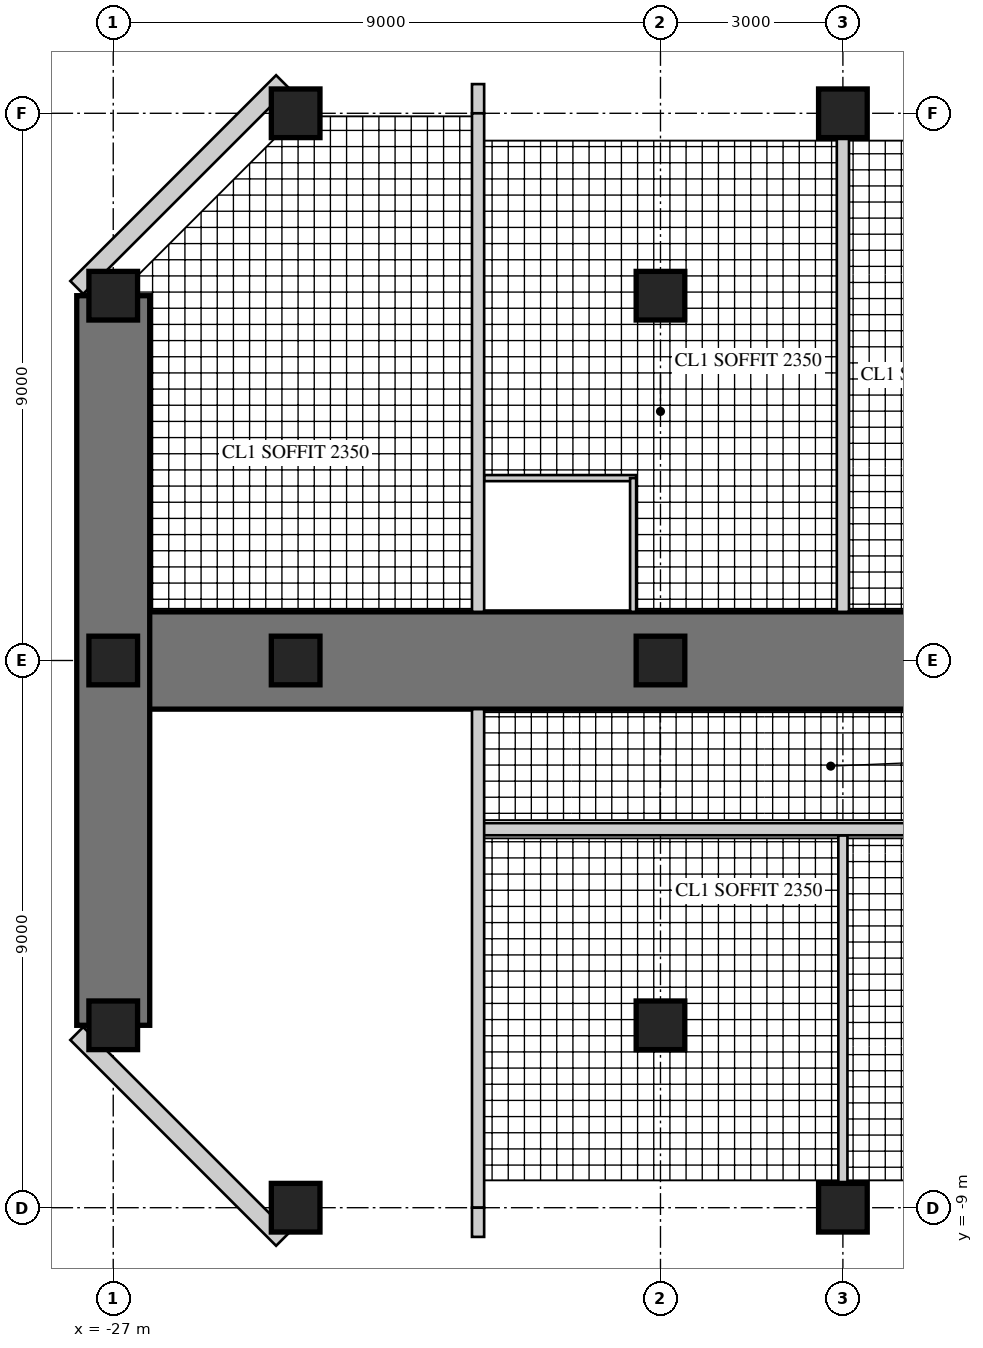
"""IFC4 building model, lengths in metres.
Left out: names, types, materials, properties, quantities, classifications, styles, units other than length and angle.
Written with IfcOpenShell. Run it as: python <this file> out.ifc"""

import sys

from ifc_helpers import new_model, si_unit, direction, frame, frame_2d, origin, origin_2d, place, context, subcontext, project, spatial, rectangle, hollow_rectangle, extrude, element, fill, save


model = new_model("IFC4")
c1 = context("Model", 3, precision=1e-05, world=origin(), true_north=direction((0.0, 1.0)))
c2 = subcontext(c1, "Body", "Model", "MODEL_VIEW")
j1 = project(units=[si_unit("LENGTHUNIT", "METRE"), si_unit("PLANEANGLEUNIT", "RADIAN")], contexts=[c1])
p1 = place(None, origin())
s1 = spatial("IfcSite", under=j1, at=p1, CompositionType="ELEMENT")
p2 = place(p1, origin())
s2 = spatial("IfcBuilding", under=s1, at=p2, CompositionType="ELEMENT")
p3 = place(p2, frame((0.0, 0.0, 235.7)))
s3 = spatial("IfcBuildingStorey", under=s2, at=p3, CompositionType="ELEMENT", Elevation=235.7)
p4 = place(p3, frame((-9.0, 0.0, 0.0), z_axis=(0.0, 0.0, 1.0), x_axis=(-1.0, 0.0, 0.0)))
e1 = element("IfcWall", 1, at=p4, inside=s3, PredefinedType="SHEAR", context=c2, shape_type="SweptSolid", body=[
    extrude(rectangle(XDim=18.0, YDim=1.6, at=frame_2d((9.0, 0.0))), origin(), (0.0, 0.0, 1.0), 3.4),
])
p5 = place(p4, frame((3.8, 0.0, 0.0)))
e2 = element("IfcOpeningElement", 2, at=p5, cuts=e1, PredefinedType="OPENING", context=c2, shape_type="SweptSolid", body=[
    extrude(rectangle(XDim=1.0, YDim=2.15, at=frame_2d((0.5, 1.075))), frame((0.0, 0.81, 0.0), z_axis=(0.0, -1.0, 0.0), x_axis=(1.0, 0.0, 0.0)), (0.0, 0.0, 1.0), 1.62),
])
p6 = place(p4, frame((6.6, 0.0, 0.0)))
e3 = element("IfcOpeningElement", 3, at=p6, cuts=e1, PredefinedType="OPENING", context=c2, shape_type="SweptSolid", body=[
    extrude(rectangle(XDim=1.0, YDim=2.15, at=frame_2d((0.5, 1.075))), frame((0.0, 0.81, 0.0), z_axis=(0.0, -1.0, 0.0), x_axis=(1.0, 0.0, 0.0)), (0.0, 0.0, 1.0), 1.62),
])
p7 = place(p4, frame((13.3, 0.0, 0.0)))
e4 = element("IfcOpeningElement", 4, at=p7, cuts=e1, PredefinedType="OPENING", context=c2, shape_type="SweptSolid", body=[
    extrude(rectangle(XDim=1.0, YDim=2.2, at=frame_2d((0.5, 1.1))), frame((0.0, 0.81, 0.0), z_axis=(0.0, -1.0, 0.0), x_axis=(1.0, 0.0, 0.0)), (0.0, 0.0, 1.0), 1.62),
])
p8 = place(p3, frame((-27.0, 6.0, 0.0), z_axis=(0.0, 0.0, 1.0), x_axis=(0.0, -1.0, 0.0)))
e5 = element("IfcWall", 5, at=p8, inside=s3, PredefinedType="SHEAR", context=c2, shape_type="SweptSolid", body=[
    extrude(rectangle(XDim=12.0, YDim=1.2, at=frame_2d((6.0, 0.0))), origin(), (0.0, 0.0, 1.0), 3.4),
])
p9 = place(p8, frame((1.4, 0.0, 0.6)))
e6 = element("IfcOpeningElement", 6, at=p9, cuts=e5, PredefinedType="OPENING", context=c2, shape_type="SweptSolid", body=[
    extrude(rectangle(XDim=3.0, YDim=2.4, at=frame_2d((1.5, 1.2))), frame((0.0, 0.61, 0.0), z_axis=(0.0, -1.0, 0.0), x_axis=(1.0, 0.0, 0.0)), (0.0, 0.0, 1.0), 1.22),
])
p10 = place(p8, frame((7.6, 0.0, 0.6)))
e7 = element("IfcOpeningElement", 7, at=p10, cuts=e5, PredefinedType="OPENING", context=c2, shape_type="SweptSolid", body=[
    extrude(rectangle(XDim=3.0, YDim=2.4, at=frame_2d((1.5, 1.2))), frame((0.0, 0.61, 0.0), z_axis=(0.0, -1.0, 0.0), x_axis=(1.0, 0.0, 0.0)), (0.0, 0.0, 1.0), 1.22),
])
for number, where, z_axis, x_axis in (
    (8, (-15.0, 9.0, 0.0), (0.0, 0.0, 1.0), (1.0, 0.0, 0.0)),
    (9, (-24.0, 9.0, 0.0), (0.0, 0.0, 1.0), (1.0, 0.0, 0.0)),
    (10, (-15.0, -9.0, 0.0), (0.0, 0.0, 1.0), (1.0, 0.0, 0.0)),
    (11, (-24.0, -9.0, 0.0), (0.0, 0.0, 1.0), (1.0, 0.0, 0.0)),
    (12, (-27.0, 6.0, 0.0), (0.0, 0.0, 1.0), (1.0, 0.0, 0.0)),
    (13, (-27.0, 0.0, 0.0), (0.0, 0.0, 1.0), (1.0, 0.0, 0.0)),
    (14, (-27.0, -6.0, 0.0), (0.0, 0.0, 1.0), (1.0, 0.0, 0.0)),
    (15, (-18.0, 6.0, 0.0), (0.0, 0.0, 1.0), (1.0, 0.0, 0.0)),
    (16, (-18.0, 0.0, 0.0), (0.0, 0.0, 1.0), (1.0, 0.0, 0.0)),
    (17, (-18.0, -6.0, 0.0), (0.0, 0.0, 1.0), (1.0, 0.0, 0.0)),
    (18, (-24.0, 0.0, 0.0), (0.0, 0.0, 1.0), (1.0, 0.0, 0.0)),
):
    element("IfcColumn", number, at=place(p3, frame(where, z_axis=z_axis, x_axis=x_axis)), inside=s3, PredefinedType="COLUMN", context=c2, shape_type="SweptSolid", body=[
        extrude(rectangle(XDim=0.8, YDim=0.8, at=origin_2d()), origin(), (0.0, 0.0, 1.0), 3.4),
    ])
p11 = place(p3, frame((-24.215, 9.52, 0.0), z_axis=(0.0, 0.0, 1.0), x_axis=(-0.707132283189, -0.707081278264, 0.0)))
e19 = element("IfcWall", 19, at=p11, inside=s3, PredefinedType="SOLIDWALL", context=c2, shape_type="SweptSolid", body=[
    extrude(rectangle(XDim=4.787, YDim=0.3, at=frame_2d((2.393, 0.0))), origin(), (0.0, 0.0, 1.0), 3.22),
])
p12 = place(p11, frame((1.943, 0.0, 0.3)))
e20 = element("IfcOpeningElement", 20, at=p12, cuts=e19, PredefinedType="OPENING", context=c2, shape_type="SweptSolid", body=[
    extrude(rectangle(XDim=0.9, YDim=2.4, at=frame_2d((0.45, 1.2))), frame((0.0, 0.16, 0.0), z_axis=(0.0, -1.0, 0.0), x_axis=(1.0, 0.0, 0.0)), (0.0, 0.0, 1.0), 0.32),
])
p13 = place(p3, frame((-27.6, -6.135, 0.0), z_axis=(0.0, 0.0, 1.0), x_axis=(0.707132283189, -0.707081278264, 0.0)))
e21 = element("IfcWall", 21, at=p13, inside=s3, PredefinedType="SOLIDWALL", context=c2, shape_type="SweptSolid", body=[
    extrude(rectangle(XDim=4.787, YDim=0.3, at=frame_2d((2.393, 0.0))), origin(), (0.0, 0.0, 1.0), 3.22),
])
p14 = place(p13, frame((1.943, 0.0, 0.3)))
e22 = element("IfcOpeningElement", 22, at=p14, cuts=e21, PredefinedType="OPENING", context=c2, shape_type="SweptSolid", body=[
    extrude(rectangle(XDim=0.9, YDim=2.4, at=frame_2d((0.45, 1.2))), frame((0.0, 0.16, 0.0), z_axis=(0.0, -1.0, 0.0), x_axis=(1.0, 0.0, 0.0)), (0.0, 0.0, 1.0), 0.32),
])
p15 = place(p3, frame((-15.0, -2.875, 0.0), z_axis=(0.0, 0.0, 1.0), x_axis=(0.0, -1.0, 0.0)))
e23 = element("IfcWall", 23, at=p15, inside=s3, PredefinedType="PARTITIONING", context=c2, shape_type="SweptSolid", body=[
    extrude(rectangle(XDim=5.725, YDim=0.15, at=frame_2d((2.863, 0.0))), origin(), (0.0, 0.0, 1.0), 2.52),
])
p16 = place(p15, frame((0.5, 0.0, 0.0)))
e24 = element("IfcOpeningElement", 24, at=p16, cuts=e23, PredefinedType="OPENING", context=c2, shape_type="SweptSolid", body=[
    extrude(rectangle(XDim=1.0, YDim=2.1, at=frame_2d((0.5, 1.05))), frame((0.0, 0.085, 0.0), z_axis=(0.0, -1.0, 0.0), x_axis=(1.0, 0.0, 0.0)), (0.0, 0.0, 1.0), 0.17),
])
p17 = place(p3, frame((-15.0, 8.6, 0.0), z_axis=(0.0, 0.0, 1.0), x_axis=(0.0, -1.0, 0.0)))
e25 = element("IfcWall", 25, at=p17, inside=s3, PredefinedType="SOLIDWALL", context=c2, shape_type="SweptSolid", body=[
    extrude(rectangle(XDim=7.8, YDim=0.2, at=frame_2d((3.9, 0.0))), origin(), (0.0, 0.0, 1.0), 2.52),
])
p18 = place(p3, frame((-18.4, 3.0, 0.0), z_axis=(0.0, 0.0, 1.0), x_axis=(-1.0, 0.0, 0.0)))
e26 = element("IfcWall", 26, at=p18, inside=s3, PredefinedType="PARTITIONING", context=c2, shape_type="SweptSolid", body=[
    extrude(rectangle(XDim=2.5, YDim=0.1, at=frame_2d((1.25, 0.0))), origin(), (0.0, 0.0, 1.0), 3.22),
])
p19 = place(p3, frame((-18.45, 3.0, 0.0), z_axis=(0.0, 0.0, 1.0), x_axis=(0.0, -1.0, 0.0)))
e27 = element("IfcWall", 27, at=p19, inside=s3, PredefinedType="PARTITIONING", context=c2, shape_type="SweptSolid", body=[
    extrude(rectangle(XDim=2.2, YDim=0.1, at=frame_2d((1.1, 0.0))), origin(), (0.0, 0.0, 1.0), 3.22),
])
p20 = place(p19, frame((0.55, 0.0, 0.0)))
e28 = element("IfcOpeningElement", 28, at=p20, cuts=e27, PredefinedType="OPENING", context=c2, shape_type="SweptSolid", body=[
    extrude(rectangle(XDim=0.9, YDim=2.1, at=frame_2d((0.45, 1.05))), frame((0.0, 0.06, 0.0), z_axis=(0.0, -1.0, 0.0), x_axis=(1.0, 0.0, 0.0)), (0.0, 0.0, 1.0), 0.12),
])
p21 = place(p3, frame((-9.4, -2.775, 0.0), z_axis=(0.0, 0.0, 1.0), x_axis=(-1.0, 0.0, 0.0)))
e29 = element("IfcWall", 29, at=p21, inside=s3, PredefinedType="SOLIDWALL", context=c2, shape_type="SweptSolid", body=[
    extrude(rectangle(XDim=11.6, YDim=0.2, at=frame_2d((5.8, 0.0))), origin(), (0.0, 0.0, 1.0), 3.22),
])
p22 = place(p21, frame((3.4, 0.0, 0.0)))
e30 = element("IfcOpeningElement", 30, at=p22, cuts=e29, PredefinedType="OPENING", context=c2, shape_type="SweptSolid", body=[
    extrude(rectangle(XDim=1.0, YDim=2.15, at=frame_2d((0.5, 1.075))), frame((0.0, 0.11, 0.0), z_axis=(0.0, -1.0, 0.0), x_axis=(1.0, 0.0, 0.0)), (0.0, 0.0, 1.0), 0.22),
])
p23 = place(p3, frame((-21.0, 9.48, 0.0), z_axis=(0.0, 0.0, 1.0), x_axis=(0.0, -1.0, 0.0)))
e31 = element("IfcWall", 31, at=p23, inside=s3, PredefinedType="SOLIDWALL", context=c2, shape_type="SweptSolid", body=[
    extrude(rectangle(XDim=0.48, YDim=0.2, at=frame_2d((0.24, 0.0))), origin(), (0.0, 0.0, 1.0), 3.22),
])
p24 = place(p3, frame((-21.0, 9.0, 0.0), z_axis=(0.0, 0.0, 1.0), x_axis=(0.0, -1.0, 0.0)))
e32 = element("IfcWall", 32, at=p24, inside=s3, PredefinedType="SOLIDWALL", context=c2, shape_type="SweptSolid", body=[
    extrude(rectangle(XDim=8.2, YDim=0.2, at=frame_2d((4.1, 0.0))), origin(), (0.0, 0.0, 1.0), 2.67),
])
p25 = place(p3, frame((-21.0, -0.8, 0.0), z_axis=(0.0, 0.0, 1.0), x_axis=(0.0, -1.0, 0.0)))
e33 = element("IfcWall", 33, at=p25, inside=s3, PredefinedType="SOLIDWALL", context=c2, shape_type="SweptSolid", body=[
    extrude(rectangle(XDim=8.2, YDim=0.2, at=frame_2d((4.1, 0.0))), origin(), (0.0, 0.0, 1.0), 2.67),
])
p26 = place(p25, frame((0.35, 0.0, 0.0)))
e34 = element("IfcOpeningElement", 34, at=p26, cuts=e33, PredefinedType="OPENING", context=c2, shape_type="SweptSolid", body=[
    extrude(rectangle(XDim=1.0, YDim=2.2, at=frame_2d((0.5, 1.1))), frame((0.0, 0.11, 0.0), z_axis=(0.0, -1.0, 0.0), x_axis=(1.0, 0.0, 0.0)), (0.0, 0.0, 1.0), 0.22),
])
p27 = place(p3, frame((-21.0, -9.0, 0.0), z_axis=(0.0, 0.0, 1.0), x_axis=(0.0, -1.0, 0.0)))
e35 = element("IfcWall", 35, at=p27, inside=s3, PredefinedType="SOLIDWALL", context=c2, shape_type="SweptSolid", body=[
    extrude(rectangle(XDim=0.48, YDim=0.2, at=frame_2d((0.24, 0.0))), origin(), (0.0, 0.0, 1.0), 3.22),
])
p28 = place(p12, origin())
e36 = element("IfcWindow", 36, at=p28, inside=s3, PartitioningType="SINGLE_PANEL", PredefinedType="WINDOW", context=c2, shape_type="SweptSolid", body=[
    extrude(hollow_rectangle(XDim=0.9, YDim=2.4, WallThickness=0.06, at=frame_2d((0.45, 1.2))), frame((0.0, 0.03, 0.0), z_axis=(0.0, -1.0, 0.0), x_axis=(1.0, 0.0, 0.0)), (0.0, 0.0, 1.0), 0.06),
    extrude(rectangle(XDim=0.779, YDim=2.279, at=frame_2d((0.45, 1.2))), frame((0.0, 0.03, 0.0), z_axis=(0.0, -1.0, 0.0), x_axis=(1.0, 0.0, 0.0)), (0.0, 0.0, 1.0), 0.06),
])
fill(e20, e36)
p29 = place(p9, origin())
e37 = element("IfcWindow", 37, at=p29, inside=s3, PartitioningType="SINGLE_PANEL", PredefinedType="WINDOW", context=c2, shape_type="SweptSolid", body=[
    extrude(hollow_rectangle(XDim=3.0, YDim=2.4, WallThickness=0.06, at=frame_2d((1.5, 1.2))), frame((0.0, 0.03, 0.0), z_axis=(0.0, -1.0, 0.0), x_axis=(1.0, 0.0, 0.0)), (0.0, 0.0, 1.0), 0.06),
    extrude(rectangle(XDim=2.879, YDim=2.279, at=frame_2d((1.5, 1.2))), frame((0.0, 0.03, 0.0), z_axis=(0.0, -1.0, 0.0), x_axis=(1.0, 0.0, 0.0)), (0.0, 0.0, 1.0), 0.06),
])
fill(e6, e37)
p30 = place(p10, origin())
e38 = element("IfcWindow", 38, at=p30, inside=s3, PartitioningType="SINGLE_PANEL", PredefinedType="WINDOW", context=c2, shape_type="SweptSolid", body=[
    extrude(hollow_rectangle(XDim=3.0, YDim=2.4, WallThickness=0.06, at=frame_2d((1.5, 1.2))), frame((0.0, 0.03, 0.0), z_axis=(0.0, -1.0, 0.0), x_axis=(1.0, 0.0, 0.0)), (0.0, 0.0, 1.0), 0.06),
    extrude(rectangle(XDim=2.879, YDim=2.279, at=frame_2d((1.5, 1.2))), frame((0.0, 0.03, 0.0), z_axis=(0.0, -1.0, 0.0), x_axis=(1.0, 0.0, 0.0)), (0.0, 0.0, 1.0), 0.06),
])
fill(e7, e38)
p31 = place(p14, origin())
e39 = element("IfcWindow", 39, at=p31, inside=s3, PartitioningType="SINGLE_PANEL", PredefinedType="WINDOW", context=c2, shape_type="SweptSolid", body=[
    extrude(hollow_rectangle(XDim=0.9, YDim=2.4, WallThickness=0.06, at=frame_2d((0.45, 1.2))), frame((0.0, 0.03, 0.0), z_axis=(0.0, -1.0, 0.0), x_axis=(1.0, 0.0, 0.0)), (0.0, 0.0, 1.0), 0.06),
    extrude(rectangle(XDim=0.779, YDim=2.279, at=frame_2d((0.45, 1.2))), frame((0.0, 0.03, 0.0), z_axis=(0.0, -1.0, 0.0), x_axis=(1.0, 0.0, 0.0)), (0.0, 0.0, 1.0), 0.06),
])
fill(e22, e39)
p32 = place(p16, origin())
e40 = element("IfcDoor", 40, at=p32, inside=s3, OperationType="SINGLE_SWING_LEFT", PredefinedType="DOOR", context=c2, shape_type="SweptSolid", body=[
    extrude(rectangle(XDim=1.0, YDim=2.1, at=frame_2d((0.5, 1.05))), frame((0.0, 0.025, 0.0), z_axis=(0.0, -1.0, 0.0), x_axis=(1.0, 0.0, 0.0)), (0.0, 0.0, 1.0), 0.05),
])
fill(e24, e40)
p33 = place(p20, frame((0.9, 0.0, 0.0), z_axis=(0.0, 0.0, 1.0), x_axis=(-1.0, 0.0, 0.0)))
e41 = element("IfcDoor", 41, at=p33, inside=s3, OperationType="SINGLE_SWING_RIGHT", PredefinedType="DOOR", context=c2, shape_type="SweptSolid", body=[
    extrude(rectangle(XDim=0.9, YDim=2.1, at=frame_2d((0.45, 1.05))), frame((0.0, 0.025, 0.0), z_axis=(0.0, -1.0, 0.0), x_axis=(1.0, 0.0, 0.0)), (0.0, 0.0, 1.0), 0.05),
])
fill(e28, e41)
p34 = place(p26, frame((1.0, 0.0, 0.0), z_axis=(0.0, 0.0, 1.0), x_axis=(-1.0, 0.0, 0.0)))
e42 = element("IfcDoor", 42, at=p34, inside=s3, OperationType="SINGLE_SWING_RIGHT", PredefinedType="DOOR", context=c2, shape_type="SweptSolid", body=[
    extrude(rectangle(XDim=1.0, YDim=2.2, at=frame_2d((0.5, 1.1))), frame((0.0, 0.025, 0.0), z_axis=(0.0, -1.0, 0.0), x_axis=(1.0, 0.0, 0.0)), (0.0, 0.0, 1.0), 0.05),
])
fill(e34, e42)
p35 = place(p6, frame((1.0, 0.0, 0.0), z_axis=(0.0, 0.0, 1.0), x_axis=(-1.0, 0.0, 0.0)))
e43 = element("IfcDoor", 43, at=p35, inside=s3, OperationType="SINGLE_SWING_RIGHT", PredefinedType="DOOR", context=c2, shape_type="SweptSolid", body=[
    extrude(rectangle(XDim=1.0, YDim=2.15, at=frame_2d((0.5, 1.075))), frame((0.0, 0.025, 0.0), z_axis=(0.0, -1.0, 0.0), x_axis=(1.0, 0.0, 0.0)), (0.0, 0.0, 1.0), 0.05),
])
fill(e3, e43)
p36 = place(p7, origin())
e44 = element("IfcDoor", 44, at=p36, inside=s3, OperationType="SINGLE_SWING_LEFT", PredefinedType="DOOR", context=c2, shape_type="SweptSolid", body=[
    extrude(rectangle(XDim=1.0, YDim=2.2, at=frame_2d((0.5, 1.1))), frame((0.0, 0.025, 0.0), z_axis=(0.0, -1.0, 0.0), x_axis=(1.0, 0.0, 0.0)), (0.0, 0.0, 1.0), 0.05),
])
fill(e4, e44)
save(model, sys.argv[1])
